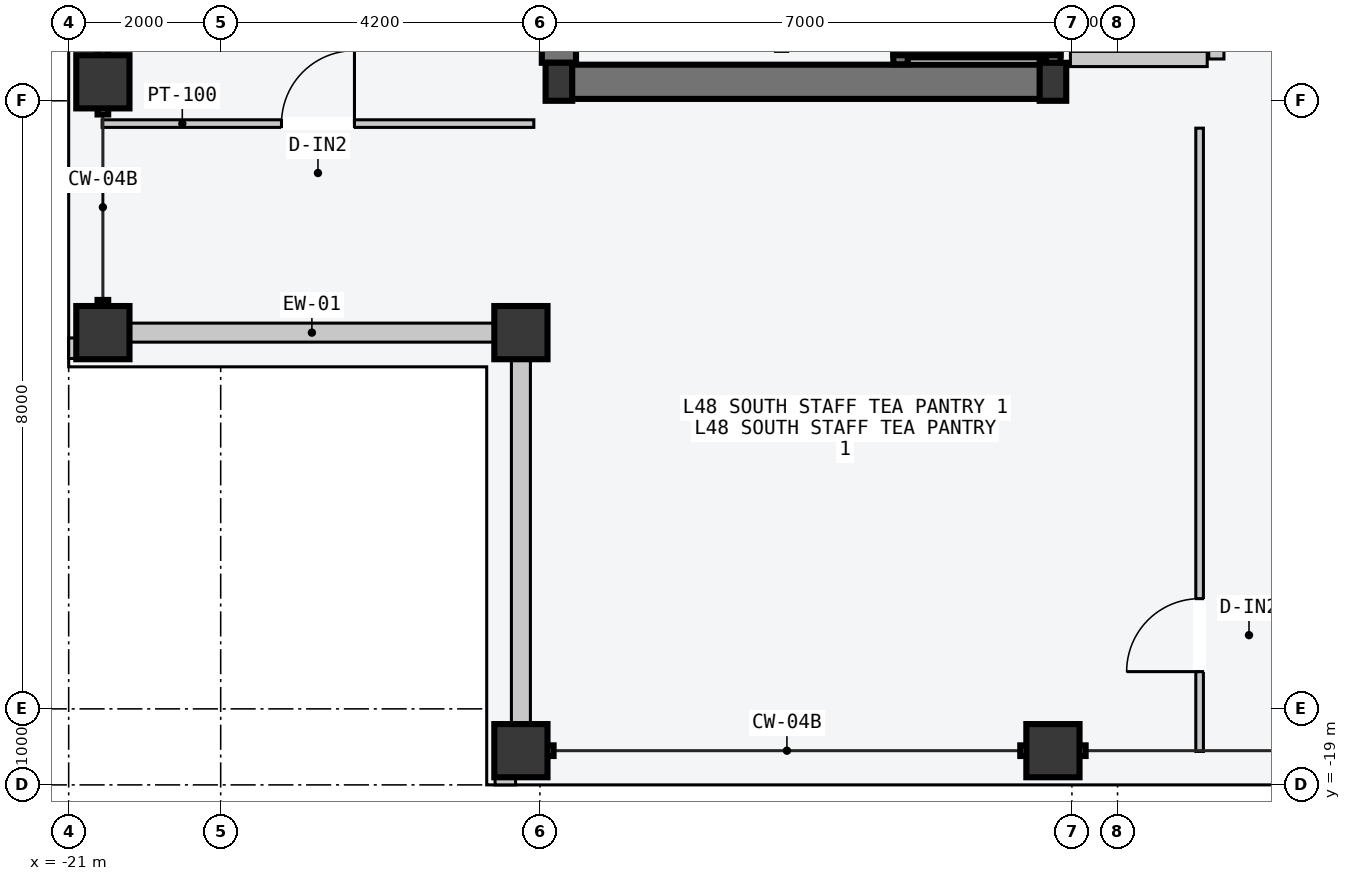
"""IFC4 building model, lengths in metres.
Left out: names, types, materials, properties, quantities, classifications, styles, units other than length and angle.
Written with IfcOpenShell. Run it as: python <this file> out.ifc"""

import sys

from ifc_helpers import new_model, si_unit, direction, frame, frame_2d, origin, origin_2d, place, context, subcontext, project, spatial, rectangle, hollow_rectangle, i_section, extrude, element, fill, save


model = new_model("IFC4")
c1 = context("Model", 3, precision=1e-05, world=origin(), true_north=direction((0.0, 1.0)))
c2 = subcontext(c1, "Body", "Model", "MODEL_VIEW")
j1 = project(units=[si_unit("LENGTHUNIT", "METRE"), si_unit("PLANEANGLEUNIT", "RADIAN")], contexts=[c1])
p1 = place(None, origin())
s1 = spatial("IfcSite", under=j1, at=p1, CompositionType="ELEMENT")
p2 = place(p1, origin())
s2 = spatial("IfcBuilding", under=s1, at=p2, CompositionType="ELEMENT")
p3 = place(p2, frame((0.0, 0.0, 183.9)))
s3 = spatial("IfcBuildingStorey", under=s2, at=p3, CompositionType="ELEMENT", Elevation=183.9)
p4 = place(p3, frame((-14.53, -9.75, -0.2), z_axis=(0.0, 0.0, 1.0), x_axis=(1.0, 0.0, 0.0)))
e1 = element("IfcWall", 1, at=p4, inside=s3, PredefinedType="SHEAR", context=c2, shape_type="SweptSolid", body=[
    extrude(rectangle(XDim=6.46, YDim=0.45, at=frame_2d((3.23, 0.0))), origin(), (0.0, 0.0, 1.0), 3.6),
])
p5 = place(p3, frame((-14.55, -9.5, -0.2), z_axis=(0.0, 0.0, 1.0), x_axis=(0.0, 1.0, 0.0)))
e2 = element("IfcWall", 2, at=p5, inside=s3, PredefinedType="SHEAR", context=c2, shape_type="SweptSolid", body=[
    extrude(rectangle(XDim=9.25, YDim=0.45, at=frame_2d((4.625, 0.0))), origin(), (0.0, 0.0, 1.0), 3.6),
])
for number, where, z_axis, x_axis in (
    (3, (-14.55, -9.75, 0.0), (0.0, 0.0, 1.0), (1.0, 0.0, 0.0)),
    (4, (-8.05, -9.75, 0.0), (0.0, 0.0, 1.0), (1.0, 0.0, 0.0)),
):
    element("IfcColumn", number, at=place(p3, frame(where, z_axis=z_axis, x_axis=x_axis)), inside=s3, PredefinedType="COLUMN", context=c2, shape_type="SweptSolid", body=[
        extrude(i_section(OverallWidth=0.35, OverallDepth=0.5, WebThickness=0.02, FlangeThickness=0.032, at=origin_2d()), origin(), (0.0, 0.0, 1.0), 3.6),
    ])
for number, where, z_axis, x_axis in (
    (5, (-15.05, -18.55, 0.0), (0.0, 0.0, 1.0), (1.0, 0.0, 0.0)),
    (6, (-8.05, -18.55, 0.0), (0.0, 0.0, 1.0), (1.0, 0.0, 0.0)),
    (7, (-20.55, -13.05, 0.0), (0.0, 0.0, 1.0), (0.0, 1.0, 0.0)),
    (8, (-20.55, -9.75, 0.0), (0.0, 0.0, 1.0), (0.0, 1.0, 0.0)),
    (9, (-15.05, -13.05, 0.0), (0.0, 0.0, 1.0), (1.0, 0.0, 0.0)),
):
    element("IfcColumn", number, at=place(p3, frame(where, z_axis=z_axis, x_axis=x_axis)), inside=s3, PredefinedType="COLUMN", context=c2, shape_type="SweptSolid", body=[
        extrude(hollow_rectangle(XDim=0.7, YDim=0.7, WallThickness=0.03, at=origin_2d()), origin(), (0.0, 0.0, 1.0), 3.6),
    ])
for number, where, z_axis, x_axis in (
    (10, (-20.19, -13.05, 0.0), (0.0, 0.0, 1.0), (1.0, 0.0, 0.0)),
    (11, (-15.05, -18.19, 0.0), (0.0, 0.0, 1.0), (0.0, 1.0, 0.0)),
):
    element("IfcWall", number, at=place(p3, frame(where, z_axis=z_axis, x_axis=x_axis)), inside=s3, PredefinedType="STANDARD", context=c2, shape_type="SweptSolid", body=[
        extrude(rectangle(XDim=4.78, YDim=0.25, at=frame_2d((2.39, 0.0))), origin(), (0.0, 0.0, 1.0), 2.75),
    ])
for number, where, z_axis, x_axis in (
    (12, (-15.39, -18.89, 0.0), (0.0, 0.0, 1.0), (1.0, 0.0, 0.0)),
    (13, (-20.89, -13.39, 0.0), (0.0, 0.0, 1.0), (0.0, 1.0, 0.0)),
):
    element("IfcWall", number, at=place(p3, frame(where, z_axis=z_axis, x_axis=x_axis)), inside=s3, PredefinedType="PARAPET", context=c2, shape_type="SweptSolid", body=[
        extrude(rectangle(XDim=0.27, YDim=0.22, at=frame_2d((0.135, 0.0))), origin(), (0.0, 0.0, 1.0), 1.2),
    ])
p6 = place(p3, frame((-8.045, -9.52, -0.2), z_axis=(0.0, 0.0, 1.0), x_axis=(0.0, 1.0, 0.0)))
e14 = element("IfcWall", 14, at=p6, inside=s3, PredefinedType="SOLIDWALL", context=c2, shape_type="SweptSolid", body=[
    extrude(rectangle(XDim=2.12, YDim=0.19, at=frame_2d((1.06, 0.0))), origin(), (0.0, 0.0, 1.0), 3.6),
])
p7 = place(p6, frame((0.57, 0.0, 0.2)))
e15 = element("IfcOpeningElement", 15, at=p7, cuts=e14, PredefinedType="OPENING", context=c2, shape_type="SweptSolid", body=[
    extrude(rectangle(XDim=1.1, YDim=2.2, at=frame_2d((0.55, 1.1))), frame((0.0, 0.105, 0.0), z_axis=(0.0, -1.0, 0.0), x_axis=(1.0, 0.0, 0.0)), (0.0, 0.0, 1.0), 0.21),
])
p8 = place(p3, frame((-10.055, -9.52, -0.2), z_axis=(0.0, 0.0, 1.0), x_axis=(0.0, 1.0, 0.0)))
e16 = element("IfcWall", 16, at=p8, inside=s3, PredefinedType="SOLIDWALL", context=c2, shape_type="SweptSolid", body=[
    extrude(rectangle(XDim=2.12, YDim=0.19, at=frame_2d((1.06, 0.0))), origin(), (0.0, 0.0, 1.0), 3.6),
])
p9 = place(p3, frame((-10.15, -9.305, -0.2), z_axis=(0.0, 0.0, 1.0), x_axis=(1.0, 0.0, 0.0)))
e17 = element("IfcWall", 17, at=p9, inside=s3, PredefinedType="SOLIDWALL", context=c2, shape_type="SweptSolid", body=[
    extrude(rectangle(XDim=2.2, YDim=0.19, at=frame_2d((1.1, 0.0))), origin(), (0.0, 0.0, 1.0), 3.6),
])
p10 = place(p3, frame((-5.9, -9.45, 0.0), z_axis=(0.0, 0.0, 1.0), x_axis=(0.0, 1.0, 0.0)))
e18 = element("IfcWall", 18, at=p10, inside=s3, PredefinedType="PARTITIONING", context=c2, shape_type="SweptSolid", body=[
    extrude(rectangle(XDim=10.5, YDim=0.2, at=frame_2d((5.25, 0.0))), origin(), (0.0, 0.0, 1.0), 3.4),
])
p11 = place(p10, frame((3.9, 0.0, 0.0)))
e19 = element("IfcOpeningElement", 19, at=p11, cuts=e18, PredefinedType="OPENING", context=c2, shape_type="SweptSolid", body=[
    extrude(rectangle(XDim=1.5, YDim=2.2, at=frame_2d((0.75, 1.1))), frame((0.0, 0.11, 0.0), z_axis=(0.0, -1.0, 0.0), x_axis=(1.0, 0.0, 0.0)), (0.0, 0.0, 1.0), 0.22),
])
p12 = place(p3, frame((-6.02, -9.45, 0.0), z_axis=(0.0, 0.0, 1.0), x_axis=(-1.0, 0.0, 0.0)))
e20 = element("IfcWall", 20, at=p12, inside=s3, PredefinedType="PARTITIONING", context=c2, shape_type="SweptSolid", body=[
    extrude(rectangle(XDim=1.8, YDim=0.2, at=frame_2d((0.9, 0.0))), origin(), (0.0, 0.0, 1.0), 3.4),
])
p13 = place(p3, frame((-6.12, -18.56, 0.0), z_axis=(0.0, 0.0, 1.0), x_axis=(0.0, 1.0, 0.0)))
e21 = element("IfcWall", 21, at=p13, inside=s3, PredefinedType="PARTITIONING", context=c2, shape_type="SweptSolid", body=[
    extrude(rectangle(XDim=8.2, YDim=0.1, at=frame_2d((4.1, 0.0))), origin(), (0.0, 0.0, 1.0), 3.4),
])
p14 = place(p13, frame((1.05, 0.0, 0.0)))
e22 = element("IfcOpeningElement", 22, at=p14, cuts=e21, PredefinedType="OPENING", context=c2, shape_type="SweptSolid", body=[
    extrude(rectangle(XDim=0.96, YDim=2.18, at=frame_2d((0.48, 1.09))), frame((0.0, 0.06, 0.0), z_axis=(0.0, -1.0, 0.0), x_axis=(1.0, 0.0, 0.0)), (0.0, 0.0, 1.0), 0.12),
])
p15 = place(p3, frame((-20.56, -10.3, 0.0), z_axis=(0.0, 0.0, 1.0), x_axis=(1.0, 0.0, 0.0)))
e23 = element("IfcWall", 23, at=p15, inside=s3, PredefinedType="PARTITIONING", context=c2, shape_type="SweptSolid", body=[
    extrude(rectangle(XDim=5.68, YDim=0.1, at=frame_2d((2.84, 0.0))), origin(), (0.0, 0.0, 1.0), 3.4),
])
p16 = place(p15, frame((2.36, 0.0, 0.0)))
e24 = element("IfcOpeningElement", 24, at=p16, cuts=e23, PredefinedType="OPENING", context=c2, shape_type="SweptSolid", body=[
    extrude(rectangle(XDim=0.96, YDim=2.18, at=frame_2d((0.48, 1.09))), frame((0.0, 0.06, 0.0), z_axis=(0.0, -1.0, 0.0), x_axis=(1.0, 0.0, 0.0)), (0.0, 0.0, 1.0), 0.12),
])
p17 = place(p14, origin())
e25 = element("IfcDoor", 25, at=p17, inside=s3, OperationType="SINGLE_SWING_LEFT", PredefinedType="DOOR", context=c2, shape_type="SweptSolid", body=[
    extrude(rectangle(XDim=0.96, YDim=2.18, at=frame_2d((0.48, 1.09))), frame((0.0, 0.025, 0.0), z_axis=(0.0, -1.0, 0.0), x_axis=(1.0, 0.0, 0.0)), (0.0, 0.0, 1.0), 0.05),
])
fill(e22, e25)
p18 = place(p16, origin())
e26 = element("IfcDoor", 26, at=p18, inside=s3, OperationType="SINGLE_SWING_RIGHT", PredefinedType="DOOR", context=c2, shape_type="SweptSolid", body=[
    extrude(rectangle(XDim=0.96, YDim=2.18, at=frame_2d((0.48, 1.09))), frame((0.0, 0.025, 0.0), z_axis=(0.0, -1.0, 0.0), x_axis=(1.0, 0.0, 0.0)), (0.0, 0.0, 1.0), 0.05),
])
fill(e24, e26)
save(model, sys.argv[1])
